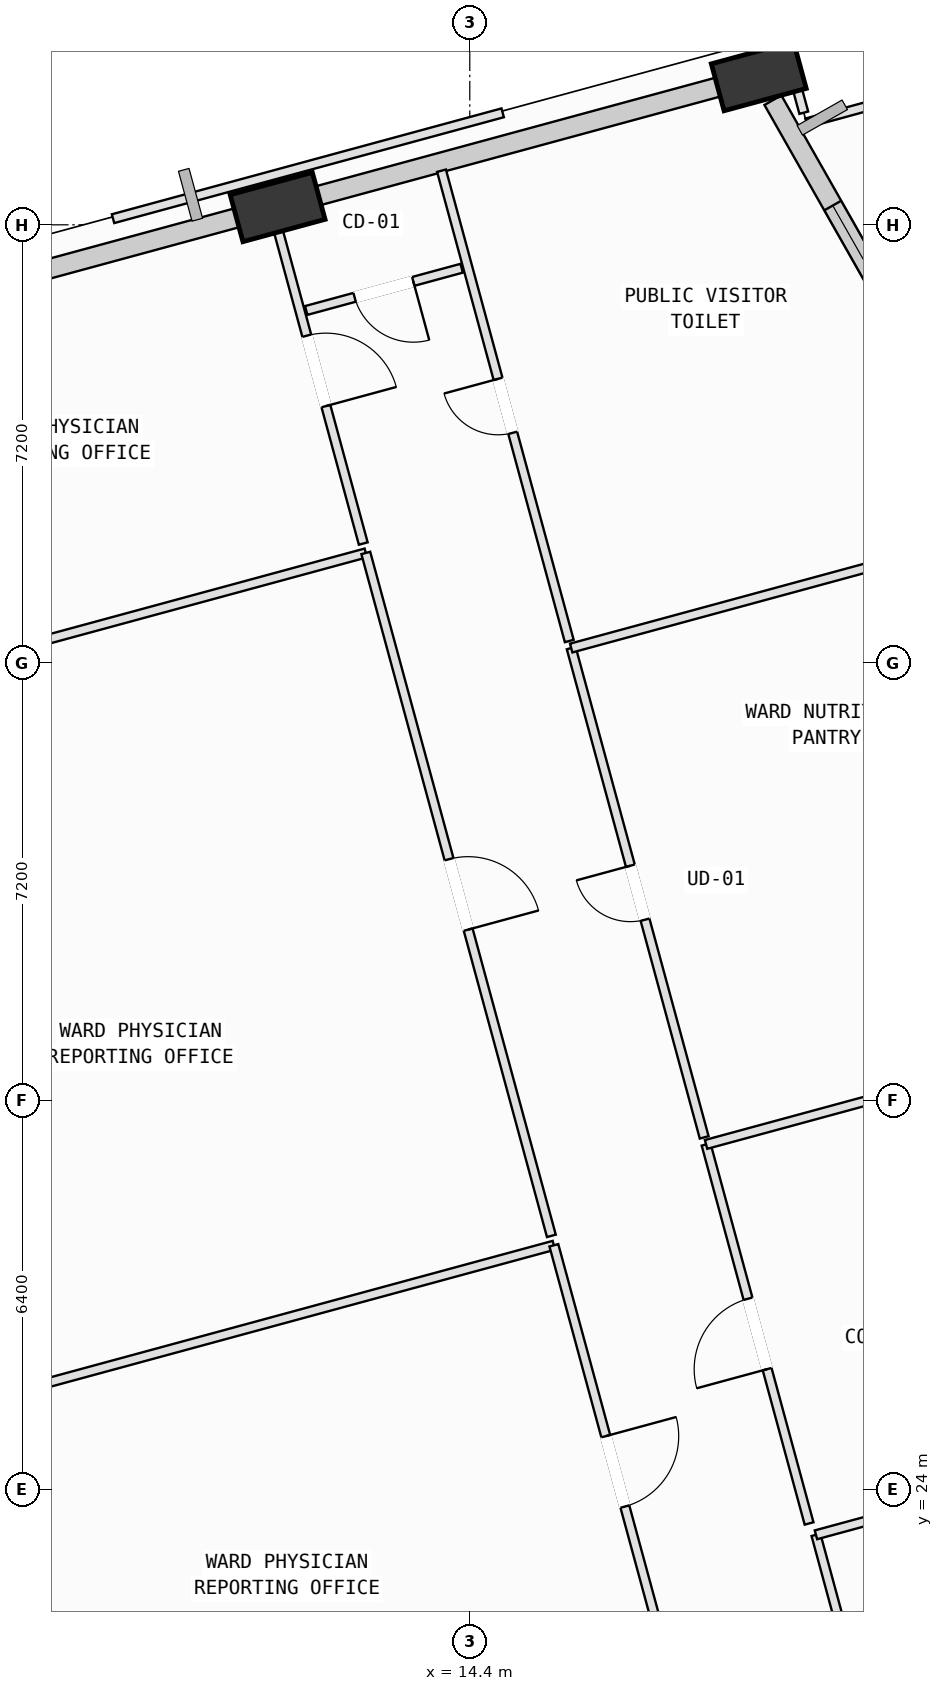
"""IFC4 building model, lengths in metres.
Left out: names, types, materials, properties, quantities, classifications, styles, units other than length and angle.
Written with IfcOpenShell. Run it as: python <this file> out.ifc"""

import sys

from ifc_helpers import new_model, si_unit, direction, frame, frame_2d, origin, origin_2d, place, context, subcontext, project, spatial, rectangle, extrude, element, fill, save


model = new_model("IFC4")
c1 = context("Model", 3, precision=1e-05, world=origin(), true_north=direction((0.0, 1.0)))
c2 = subcontext(c1, "Body", "Model", "MODEL_VIEW")
j1 = project(units=[si_unit("LENGTHUNIT", "METRE"), si_unit("PLANEANGLEUNIT", "RADIAN")], contexts=[c1])
p1 = place(None, origin())
s1 = spatial("IfcSite", under=j1, at=p1, CompositionType="ELEMENT")
p2 = place(p1, origin())
s2 = spatial("IfcBuilding", under=s1, at=p2, CompositionType="ELEMENT")
p3 = place(p2, frame((0.0, 0.0, 88.4)))
s3 = spatial("IfcBuildingStorey", under=s2, at=p3, CompositionType="ELEMENT", Elevation=88.4)
p4 = place(p3, frame((19.153, 47.245, 0.065), z_axis=(-0.091989780155, -0.060277676198, 0.993933841913), x_axis=(0.746878057935, -0.664335519439, 0.028835467529)))
e1 = element("IfcColumn", 1, at=p4, inside=s3, PredefinedType="COLUMN", context=c2, shape_type="SweptSolid", body=[
    extrude(rectangle(XDim=1.4, YDim=0.8, at=origin_2d()), origin(), (0.0, 0.0, 1.0), 3.957),
])
p5 = place(p3, frame((11.24, 45.092, 0.073), z_axis=(-0.082764973125, -0.092639988561, 0.992253894799), x_axis=(0.892975011796, -0.44892624056, 0.032570828123)))
e2 = element("IfcColumn", 2, at=p5, inside=s3, PredefinedType="COLUMN", context=c2, shape_type="SweptSolid", body=[
    extrude(rectangle(XDim=1.4, YDim=0.8, at=origin_2d()), origin(), (0.0, 0.0, 1.0), 3.956),
])
p6 = place(p3, frame((19.385, 46.85, 0.0), z_axis=(0.0, 0.0, 1.0), x_axis=(0.49366585325, -0.869651668966, 0.0)))
e3 = element("IfcWall", 3, at=p6, inside=s3, PredefinedType="SOLIDWALL", context=c2, shape_type="SweptSolid", body=[
    extrude(rectangle(XDim=5.128, YDim=0.32, at=frame_2d((2.564, 0.0))), origin(), (0.0, 0.0, 1.0), 3.165),
])
p7 = place(p6, frame((1.993, 0.0, 0.75)))
e4 = element("IfcOpeningElement", 4, at=p7, cuts=e3, PredefinedType="OPENING", context=c2, shape_type="SweptSolid", body=[
    extrude(rectangle(XDim=2.0, YDim=1.95, at=frame_2d((1.0, 0.975))), frame((0.0, 0.17, 0.0), z_axis=(0.0, -1.0, 0.0), x_axis=(1.0, 0.0, 0.0)), (0.0, 0.0, 1.0), 0.34),
])
p8 = place(p3, frame((11.504, 45.169, 0.0), z_axis=(0.0, 0.0, 1.0), x_axis=(0.965021257098, 0.262171648638, 0.0)))
e5 = element("IfcWall", 5, at=p8, inside=s3, PredefinedType="SOLIDWALL", context=c2, shape_type="SweptSolid", body=[
    extrude(rectangle(XDim=7.231, YDim=0.32, at=frame_2d((3.615, 0.0))), origin(), (0.0, 0.0, 1.0), 3.165),
])
p9 = place(p3, frame((3.567, 43.013, 0.0), z_axis=(0.0, 0.0, 1.0), x_axis=(0.965013691383, 0.262199495505, 0.0)))
e6 = element("IfcWall", 6, at=p9, inside=s3, PredefinedType="SOLIDWALL", context=c2, shape_type="SweptSolid", body=[
    extrude(rectangle(XDim=7.27, YDim=0.32, at=frame_2d((3.635, 0.0))), origin(), (0.0, 0.0, 1.0), 3.165),
])
p10 = place(p3, frame((5.202, 25.142, 0.0), z_axis=(0.0, 0.0, 1.0), x_axis=(0.965034618354, 0.262122462558, 0.0)))
e7 = element("IfcWall", 7, at=p10, inside=s3, PredefinedType="PARTITIONING", context=c2, shape_type="SweptSolid", body=[
    extrude(rectangle(XDim=10.964, YDim=0.15, at=frame_2d((5.482, 0.0))), origin(), (0.0, 0.0, 1.0), 3.78),
])
p11 = place(p3, frame((15.783, 28.016, 0.0), z_axis=(0.0, 0.0, 1.0), x_axis=(0.26227015523, -0.964994489972, 0.0)))
e8 = element("IfcWall", 8, at=p11, inside=s3, PredefinedType="PARTITIONING", context=c2, shape_type="SweptSolid", body=[
    extrude(rectangle(XDim=7.706, YDim=0.15, at=frame_2d((3.853, 0.0))), origin(), (0.0, 0.0, 1.0), 3.78),
])
p12 = place(p11, frame((3.253, 0.0, 0.0)))
e9 = element("IfcOpeningElement", 9, at=p12, cuts=e8, PredefinedType="OPENING", context=c2, shape_type="SweptSolid", body=[
    extrude(rectangle(XDim=1.2, YDim=2.15, at=frame_2d((0.6, 1.075))), frame((0.0, 0.085, 0.0), z_axis=(0.0, -1.0, 0.0), x_axis=(1.0, 0.0, 0.0)), (0.0, 0.0, 1.0), 0.17),
])
p13 = place(p3, frame((2.108, 36.529, 0.0), z_axis=(0.0, 0.0, 1.0), x_axis=(0.965040737157, 0.262099934427, 0.0)))
e10 = element("IfcWall", 10, at=p13, inside=s3, PredefinedType="PARTITIONING", context=c2, shape_type="SweptSolid", body=[
    extrude(rectangle(XDim=10.965, YDim=0.15, at=frame_2d((5.483, 0.0))), origin(), (0.0, 0.0, 1.0), 3.78),
])
p14 = place(p3, frame((12.69, 39.403, 0.0), z_axis=(0.0, 0.0, 1.0), x_axis=(0.262212125461, -0.965010259666, 0.0)))
e11 = element("IfcWall", 11, at=p14, inside=s3, PredefinedType="PARTITIONING", context=c2, shape_type="SweptSolid", body=[
    extrude(rectangle(XDim=11.639, YDim=0.15, at=frame_2d((5.82, 0.0))), origin(), (0.0, 0.0, 1.0), 3.78),
])
p15 = place(p14, frame((5.219, 0.0, 0.0)))
e12 = element("IfcOpeningElement", 12, at=p15, cuts=e11, PredefinedType="OPENING", context=c2, shape_type="SweptSolid", body=[
    extrude(rectangle(XDim=1.2, YDim=2.15, at=frame_2d((0.6, 1.075))), frame((0.0, 0.085, 0.0), z_axis=(0.0, -1.0, 0.0), x_axis=(1.0, 0.0, 0.0)), (0.0, 0.0, 1.0), 0.17),
])
p16 = place(p3, frame((10.538, 45.083, 0.0), z_axis=(0.0, 0.0, 1.0), x_axis=(0.965003184942, 0.262238160938, 0.0)))
e13 = element("IfcWall", 13, at=p16, inside=s3, PredefinedType="PARTITIONING", context=c2, shape_type="SweptSolid", body=[
    extrude(rectangle(XDim=0.587, YDim=0.15, at=frame_2d((0.294, 0.0))), origin(), (0.0, 0.0, 1.0), 3.78),
])
p17 = place(p3, frame((11.105, 45.237, 0.0), z_axis=(0.0, 0.0, 1.0), x_axis=(0.262194053335, -0.965015170034, 0.0)))
e14 = element("IfcWall", 14, at=p17, inside=s3, PredefinedType="PARTITIONING", context=c2, shape_type="SweptSolid", body=[
    extrude(rectangle(XDim=5.885, YDim=0.15, at=frame_2d((2.942, 0.0))), origin(), (0.0, 0.0, 1.0), 2.765),
])
p18 = place(p17, frame((2.342, 0.0, 0.0)))
e15 = element("IfcOpeningElement", 15, at=p18, cuts=e14, PredefinedType="OPENING", context=c2, shape_type="SweptSolid", body=[
    extrude(rectangle(XDim=1.2, YDim=2.15, at=frame_2d((0.6, 1.075))), frame((0.0, 0.085, 0.0), z_axis=(0.0, -1.0, 0.0), x_axis=(1.0, 0.0, 0.0)), (0.0, 0.0, 1.0), 0.17),
])
p19 = place(p3, frame((20.819, 20.58, 0.0), z_axis=(0.0, 0.0, 1.0), x_axis=(-0.262058493621, 0.965051991305, 0.0)))
e16 = element("IfcWall", 16, at=p19, inside=s3, PredefinedType="PARTITIONING", context=c2, shape_type="SweptSolid", body=[
    extrude(rectangle(XDim=2.771, YDim=0.15, at=frame_2d((1.385, 0.0))), origin(), (0.0, 0.0, 1.0), 3.78),
])
p20 = place(p3, frame((20.093, 23.254, 0.0), z_axis=(0.0, 0.0, 1.0), x_axis=(0.965013623276, 0.26219974617, 0.0)))
e17 = element("IfcWall", 17, at=p20, inside=s3, PredefinedType="PARTITIONING", context=c2, shape_type="SweptSolid", body=[
    extrude(rectangle(XDim=6.754, YDim=0.15, at=frame_2d((3.377, 0.0))), origin(), (0.0, 0.0, 1.0), 3.78),
])
p21 = place(p3, frame((19.98, 23.441, 0.0), z_axis=(0.0, 0.0, 1.0), x_axis=(-0.262234720493, 0.965004119871, 0.0)))
e18 = element("IfcWall", 18, at=p21, inside=s3, PredefinedType="PARTITIONING", context=c2, shape_type="SweptSolid", body=[
    extrude(rectangle(XDim=6.46, YDim=0.15, at=frame_2d((3.23, 0.0))), origin(), (0.0, 0.0, 1.0), 3.78),
])
p22 = place(p21, frame((2.63, 0.0, 0.0)))
e19 = element("IfcOpeningElement", 19, at=p22, cuts=e18, PredefinedType="OPENING", context=c2, shape_type="SweptSolid", body=[
    extrude(rectangle(XDim=1.2, YDim=2.15, at=frame_2d((0.6, 1.075))), frame((0.0, 0.085, 0.0), z_axis=(0.0, -1.0, 0.0), x_axis=(1.0, 0.0, 0.0)), (0.0, 0.0, 1.0), 0.17),
])
p23 = place(p3, frame((18.286, 29.675, 0.0), z_axis=(0.0, 0.0, 1.0), x_axis=(0.965020446002, 0.262174634161, 0.0)))
e20 = element("IfcWall", 20, at=p23, inside=s3, PredefinedType="PARTITIONING", context=c2, shape_type="SweptSolid", body=[
    extrude(rectangle(XDim=6.816, YDim=0.15, at=frame_2d((3.408, 0.0))), origin(), (0.0, 0.0, 1.0), 3.78),
])
p24 = place(p3, frame((18.255, 29.791, 0.0), z_axis=(0.0, 0.0, 1.0), x_axis=(-0.262205746142, 0.965011993029, 0.0)))
e21 = element("IfcWall", 21, at=p24, inside=s3, PredefinedType="PARTITIONING", context=c2, shape_type="SweptSolid", body=[
    extrude(rectangle(XDim=8.34, YDim=0.15, at=frame_2d((4.17, 0.0))), origin(), (0.0, 0.0, 1.0), 3.78),
])
p25 = place(p24, frame((3.71, 0.0, 0.0)))
e22 = element("IfcOpeningElement", 22, at=p25, cuts=e21, PredefinedType="OPENING", context=c2, shape_type="SweptSolid", body=[
    extrude(rectangle(XDim=0.92, YDim=2.1, at=frame_2d((0.46, 1.05))), frame((0.0, 0.085, 0.0), z_axis=(0.0, -1.0, 0.0), x_axis=(1.0, 0.0, 0.0)), (0.0, 0.0, 1.0), 0.17),
])
p26 = place(p3, frame((16.068, 37.839, 0.0), z_axis=(0.0, 0.0, 1.0), x_axis=(0.965008131897, 0.262219956093, 0.0)))
e23 = element("IfcWall", 23, at=p26, inside=s3, PredefinedType="PARTITIONING", context=c2, shape_type="SweptSolid", body=[
    extrude(rectangle(XDim=6.814, YDim=0.15, at=frame_2d((3.407, 0.0))), origin(), (0.0, 0.0, 1.0), 3.78),
])
p27 = place(p3, frame((16.036, 37.955, 0.0), z_axis=(0.0, 0.0, 1.0), x_axis=(-0.262109500246, 0.965038139081, 0.0)))
e24 = element("IfcWall", 24, at=p27, inside=s3, PredefinedType="PARTITIONING", context=c2, shape_type="SweptSolid", body=[
    extrude(rectangle(XDim=8.015, YDim=0.15, at=frame_2d((4.008, 0.0))), origin(), (0.0, 0.0, 1.0), 3.78),
])
p28 = place(p27, frame((3.548, 0.0, 0.0)))
e25 = element("IfcOpeningElement", 25, at=p28, cuts=e24, PredefinedType="OPENING", context=c2, shape_type="SweptSolid", body=[
    extrude(rectangle(XDim=0.92, YDim=2.1, at=frame_2d((0.46, 1.05))), frame((0.0, 0.085, 0.0), z_axis=(0.0, -1.0, 0.0), x_axis=(1.0, 0.0, 0.0)), (0.0, 0.0, 1.0), 0.17),
])
p29 = place(p3, frame((18.432, 47.249, 0.0), z_axis=(0.0, 0.0, 1.0), x_axis=(0.965082683379, 0.261945441346, 0.0)))
e26 = element("IfcWall", 26, at=p29, inside=s3, PredefinedType="PARTITIONING", context=c2, shape_type="SweptSolid", body=[
    extrude(rectangle(XDim=1.252, YDim=0.15, at=frame_2d((0.626, 0.0))), origin(), (0.0, 0.0, 1.0), 3.165),
])
p30 = place(p3, frame((19.653, 47.529, 0.0), z_axis=(0.0, 0.0, 1.0), x_axis=(0.261720359667, -0.965143747499, 0.0)))
e27 = element("IfcWall", 27, at=p30, inside=s3, PredefinedType="PARTITIONING", context=c2, shape_type="SweptSolid", body=[
    extrude(rectangle(XDim=0.917, YDim=0.15, at=frame_2d((0.458, 0.0))), origin(), (0.0, 0.0, 1.0), 3.78),
])
p31 = place(p3, frame((19.939, 46.476, 0.0), z_axis=(0.0, 0.0, 1.0), x_axis=(0.964880304912, 0.262689925945, 0.0)))
e28 = element("IfcWall", 28, at=p31, inside=s3, PredefinedType="PARTITIONING", context=c2, shape_type="SweptSolid", body=[
    extrude(rectangle(XDim=1.45, YDim=0.15, at=frame_2d((0.725, 0.0))), origin(), (0.0, 0.0, 1.0), 3.78),
])
p32 = place(p3, frame((14.267, 44.086, 0.0), z_axis=(0.0, 0.0, 1.0), x_axis=(-0.965010032649, -0.262212960943, 0.0)))
e29 = element("IfcWall", 29, at=p32, inside=s3, PredefinedType="PARTITIONING", context=c2, shape_type="SweptSolid", body=[
    extrude(rectangle(XDim=2.65, YDim=0.15, at=frame_2d((1.325, 0.0))), origin(), (0.0, 0.0, 1.0), 3.78),
])
p33 = place(p32, frame((0.825, 0.0, 0.0)))
e30 = element("IfcOpeningElement", 30, at=p33, cuts=e29, PredefinedType="OPENING", context=c2, shape_type="SweptSolid", body=[
    extrude(rectangle(XDim=1.0, YDim=2.12, at=frame_2d((0.5, 1.06))), frame((0.0, 0.085, 0.0), z_axis=(0.0, -1.0, 0.0), x_axis=(1.0, 0.0, 0.0)), (0.0, 0.0, 1.0), 0.17),
])
p34 = place(p3, frame((8.533, 44.901, 0.0), z_axis=(0.0, 0.0, 1.0), x_axis=(0.965008606139, 0.262218210804, 0.0)))
e31 = element("IfcWall", 31, at=p34, inside=s3, PredefinedType="PARTITIONING", context=c2, shape_type="SweptSolid", body=[
    extrude(rectangle(XDim=6.64, YDim=0.15, at=frame_2d((3.32, 0.0))), origin(), (0.0, 0.0, 1.0), 3.78),
])
p35 = place(p7, origin())
e32 = element("IfcWindow", 32, at=p35, inside=s3, PartitioningType="SINGLE_PANEL", PredefinedType="WINDOW", context=c2, shape_type="SweptSolid", body=[
    extrude(rectangle(XDim=2.0, YDim=1.95, at=frame_2d((1.0, 0.975))), frame((0.0, 0.03, 0.0), z_axis=(0.0, -1.0, 0.0), x_axis=(1.0, 0.0, 0.0)), (0.0, 0.0, 1.0), 0.06),
])
fill(e4, e32)
p36 = place(p12, origin())
e33 = element("IfcDoor", 33, at=p36, inside=s3, OperationType="SINGLE_SWING_LEFT", PredefinedType="DOOR", context=c2, shape_type="SweptSolid", body=[
    extrude(rectangle(XDim=1.2, YDim=2.15, at=frame_2d((0.6, 1.075))), frame((0.0, 0.025, 0.0), z_axis=(0.0, -1.0, 0.0), x_axis=(1.0, 0.0, 0.0)), (0.0, 0.0, 1.0), 0.05),
])
fill(e9, e33)
p37 = place(p15, origin())
e34 = element("IfcDoor", 34, at=p37, inside=s3, OperationType="SINGLE_SWING_RIGHT", PredefinedType="DOOR", context=c2, shape_type="SweptSolid", body=[
    extrude(rectangle(XDim=1.2, YDim=2.15, at=frame_2d((0.6, 1.075))), frame((0.0, 0.025, 0.0), z_axis=(0.0, -1.0, 0.0), x_axis=(1.0, 0.0, 0.0)), (0.0, 0.0, 1.0), 0.05),
])
fill(e12, e34)
p38 = place(p18, origin())
e35 = element("IfcDoor", 35, at=p38, inside=s3, OperationType="SINGLE_SWING_RIGHT", PredefinedType="DOOR", context=c2, shape_type="SweptSolid", body=[
    extrude(rectangle(XDim=1.2, YDim=2.15, at=frame_2d((0.6, 1.075))), frame((0.0, 0.025, 0.0), z_axis=(0.0, -1.0, 0.0), x_axis=(1.0, 0.0, 0.0)), (0.0, 0.0, 1.0), 0.05),
])
fill(e15, e35)
p39 = place(p22, origin())
e36 = element("IfcDoor", 36, at=p39, inside=s3, OperationType="SINGLE_SWING_LEFT", PredefinedType="DOOR", context=c2, shape_type="SweptSolid", body=[
    extrude(rectangle(XDim=1.2, YDim=2.15, at=frame_2d((0.6, 1.075))), frame((0.0, 0.025, 0.0), z_axis=(0.0, -1.0, 0.0), x_axis=(1.0, 0.0, 0.0)), (0.0, 0.0, 1.0), 0.05),
])
fill(e19, e36)
p40 = place(p25, origin())
e37 = element("IfcDoor", 37, at=p40, inside=s3, OperationType="SINGLE_SWING_RIGHT", PredefinedType="DOOR", context=c2, shape_type="SweptSolid", body=[
    extrude(rectangle(XDim=0.92, YDim=2.1, at=frame_2d((0.46, 1.05))), frame((0.0, 0.025, 0.0), z_axis=(0.0, -1.0, 0.0), x_axis=(1.0, 0.0, 0.0)), (0.0, 0.0, 1.0), 0.05),
])
fill(e22, e37)
p41 = place(p28, origin())
e38 = element("IfcDoor", 38, at=p41, inside=s3, OperationType="SINGLE_SWING_RIGHT", PredefinedType="DOOR", context=c2, shape_type="SweptSolid", body=[
    extrude(rectangle(XDim=0.92, YDim=2.1, at=frame_2d((0.46, 1.05))), frame((0.0, 0.025, 0.0), z_axis=(0.0, -1.0, 0.0), x_axis=(1.0, 0.0, 0.0)), (0.0, 0.0, 1.0), 0.05),
])
fill(e25, e38)
p42 = place(p33, origin())
e39 = element("IfcDoor", 39, at=p42, inside=s3, OperationType="SINGLE_SWING_LEFT", PredefinedType="DOOR", context=c2, shape_type="SweptSolid", body=[
    extrude(rectangle(XDim=1.0, YDim=2.12, at=frame_2d((0.5, 1.06))), frame((0.0, 0.025, 0.0), z_axis=(0.0, -1.0, 0.0), x_axis=(1.0, 0.0, 0.0)), (0.0, 0.0, 1.0), 0.05),
])
fill(e30, e39)
save(model, sys.argv[1])
